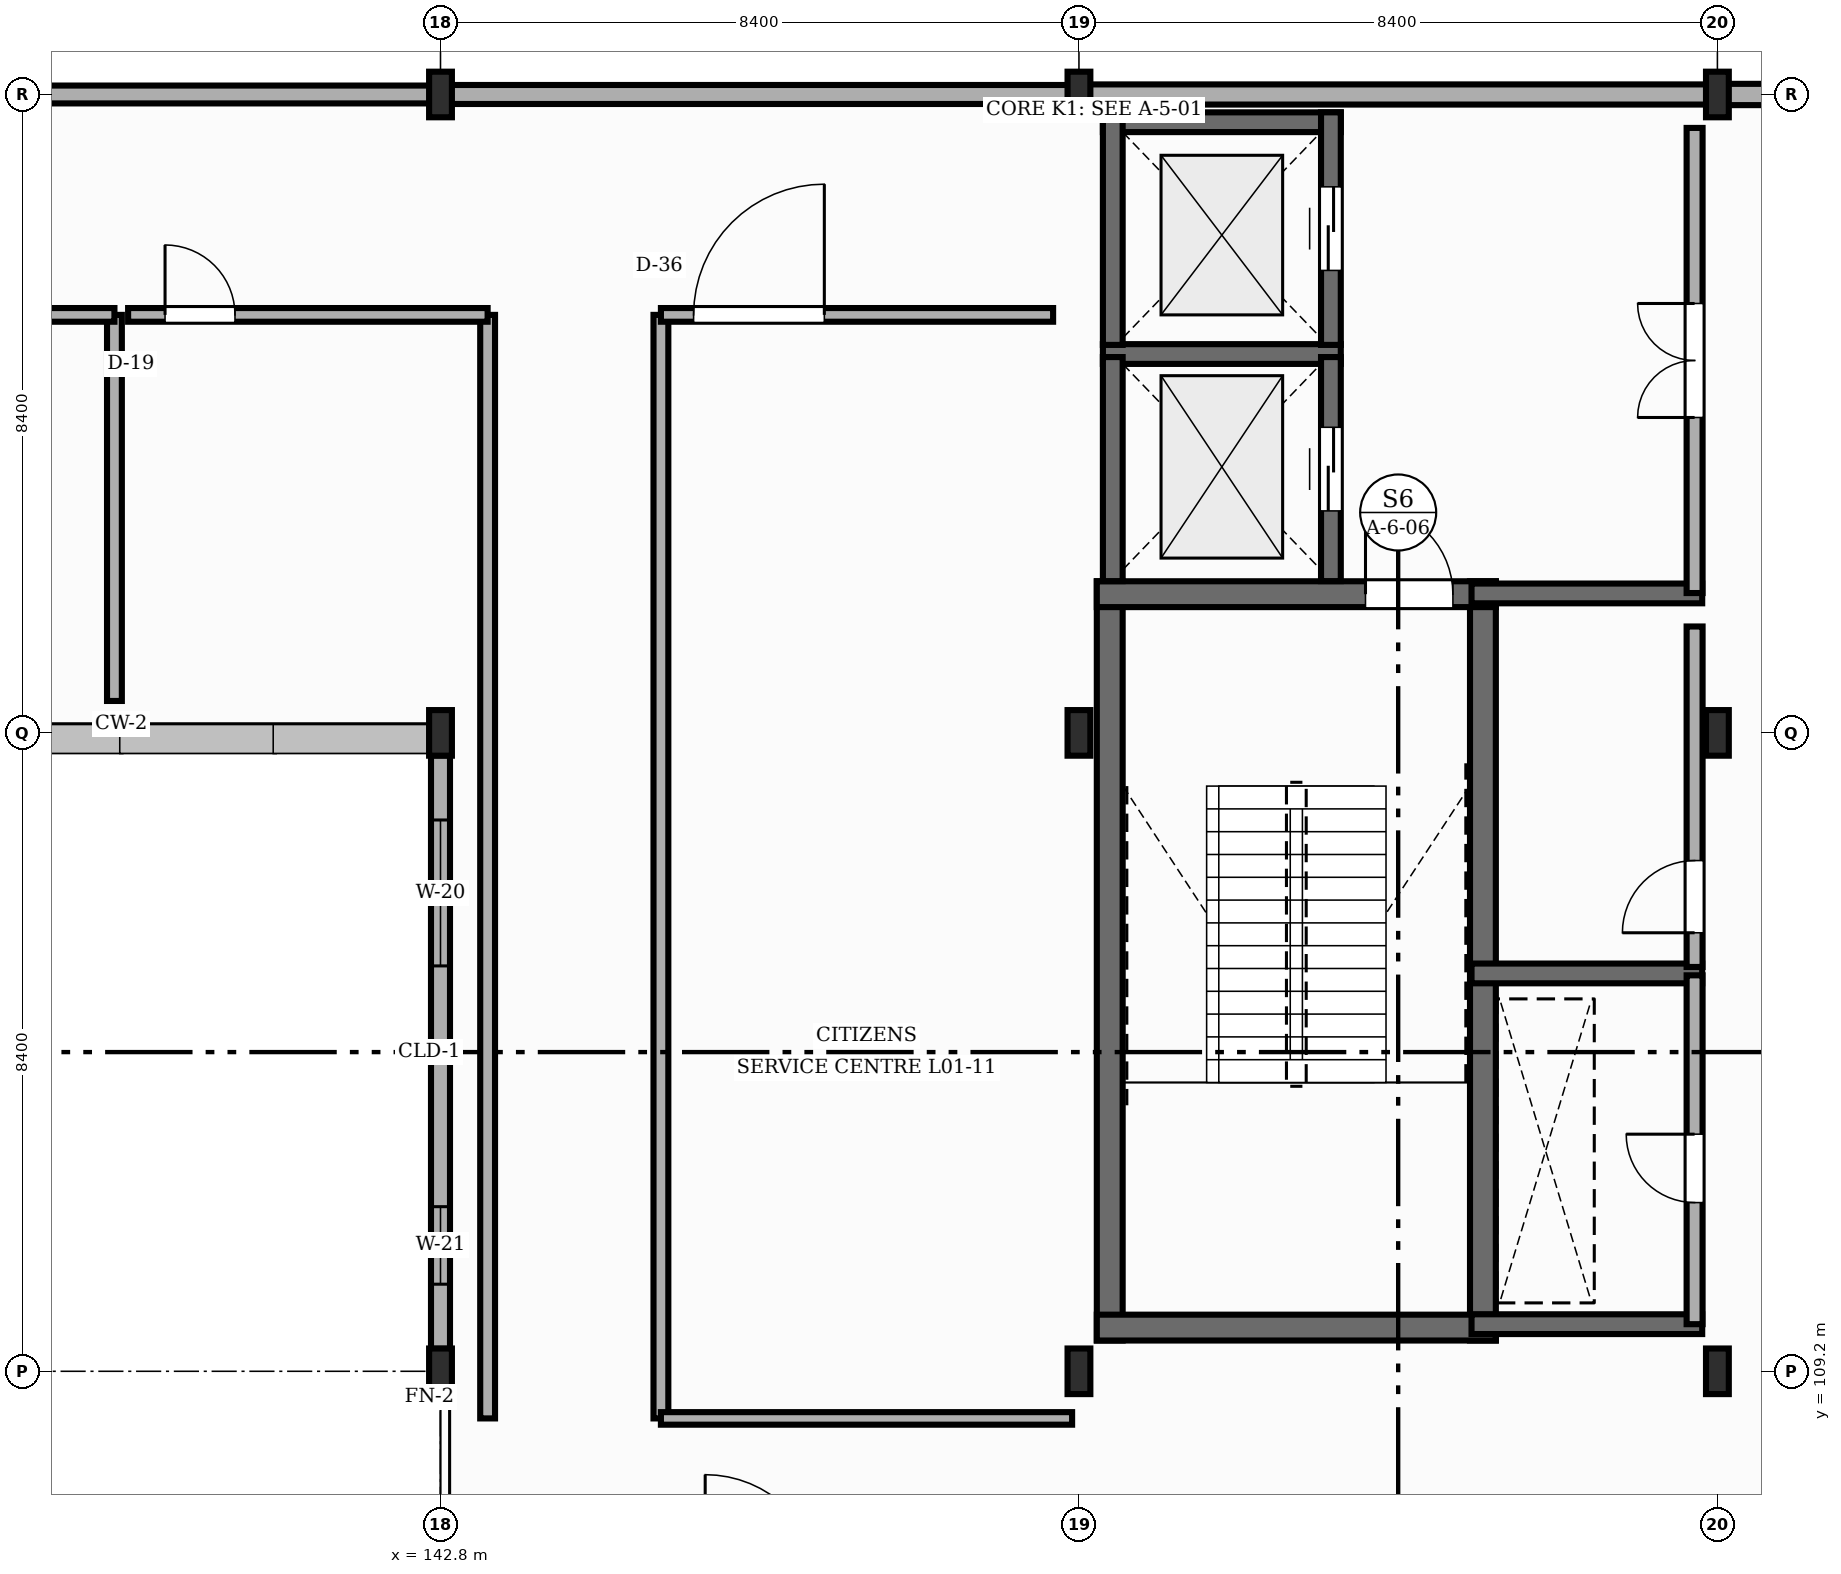
"""IFC4 building model, lengths in metres.
Left out: names, types, materials, properties, quantities, classifications, styles, units other than length and angle.
Written with IfcOpenShell. Run it as: python <this file> out.ifc"""

import sys

from ifc_helpers import new_model, si_unit, direction, frame, frame_2d, origin, origin_2d, place, context, subcontext, project, spatial, rectangle, i_section, extrude, element, fill, save


model = new_model("IFC4")
c1 = context("Model", 3, precision=1e-05, world=origin(), true_north=direction((0.0, 1.0)))
c2 = subcontext(c1, "Body", "Model", "MODEL_VIEW")
j1 = project(units=[si_unit("LENGTHUNIT", "METRE"), si_unit("PLANEANGLEUNIT", "RADIAN")], contexts=[c1])
p1 = place(None, origin())
s1 = spatial("IfcSite", under=j1, at=p1, CompositionType="ELEMENT")
p2 = place(p1, origin())
s2 = spatial("IfcBuilding", under=s1, at=p2, CompositionType="ELEMENT")
p3 = place(p2, frame((0.0, 0.0, 5.4)))
s3 = spatial("IfcBuildingStorey", under=s2, at=p3, CompositionType="ELEMENT", Elevation=5.4)
for number, where, z_axis, x_axis in (
    (1, (142.8, 109.2, 0.0), (0.0, 0.0, 1.0), (1.0, 0.0, 0.0)),
    (2, (142.8, 117.6, 0.0), (0.0, 0.0, 1.0), (1.0, 0.0, 0.0)),
    (3, (142.8, 126.0, 0.0), (0.0, 0.0, 1.0), (1.0, 0.0, 0.0)),
    (4, (151.2, 109.2, 0.0), (0.0, 0.0, 1.0), (1.0, 0.0, 0.0)),
    (5, (151.2, 117.6, 0.0), (0.0, 0.0, 1.0), (1.0, 0.0, 0.0)),
    (6, (151.2, 126.0, 0.0), (0.0, 0.0, 1.0), (1.0, 0.0, 0.0)),
    (7, (159.6, 109.2, 0.0), (0.0, 0.0, 1.0), (1.0, 0.0, 0.0)),
    (8, (159.6, 117.6, 0.0), (0.0, 0.0, 1.0), (1.0, 0.0, 0.0)),
    (9, (159.6, 126.0, 0.0), (0.0, 0.0, 1.0), (1.0, 0.0, 0.0)),
):
    element("IfcColumn", number, at=place(p3, frame(where, z_axis=z_axis, x_axis=x_axis)), inside=s3, PredefinedType="COLUMN", context=c2, shape_type="SweptSolid", body=[
        extrude(i_section(OverallWidth=0.3, OverallDepth=0.6, WebThickness=0.015, FlangeThickness=0.03, FilletRadius=0.027, at=origin_2d()), origin(), (0.0, 0.0, 1.0), 4.5),
    ])
p4 = place(p3, frame((142.8, 117.304, 0.0), z_axis=(0.0, 0.0, 1.0), x_axis=(0.0, -1.0, 0.0)))
e10 = element("IfcWall", 10, at=p4, inside=s3, PredefinedType="STANDARD", context=c2, shape_type="SweptSolid", body=[
    extrude(rectangle(XDim=7.808, YDim=0.25, at=frame_2d((3.904, 0.0))), origin(), (0.0, 0.0, 1.0), 3.922),
])
p5 = place(p4, frame((0.85, 0.0, 0.9)))
e11 = element("IfcOpeningElement", 11, at=p5, cuts=e10, PredefinedType="OPENING", context=c2, shape_type="SweptSolid", body=[
    extrude(rectangle(XDim=1.92, YDim=1.25, at=frame_2d((0.96, 0.625))), frame((0.0, 0.135, 0.0), z_axis=(0.0, -1.0, 0.0), x_axis=(1.0, 0.0, 0.0)), (0.0, 0.0, 1.0), 0.27),
])
p6 = place(p4, frame((5.938, 0.0, 0.9)))
e12 = element("IfcOpeningElement", 12, at=p6, cuts=e10, PredefinedType="OPENING", context=c2, shape_type="SweptSolid", body=[
    extrude(rectangle(XDim=1.02, YDim=1.45, at=frame_2d((0.51, 0.725))), frame((0.0, 0.135, 0.0), z_axis=(0.0, -1.0, 0.0), x_axis=(1.0, 0.0, 0.0)), (0.0, 0.0, 1.0), 0.27),
])
p7 = place(p3, frame((167.992, 126.0, 0.0), z_axis=(0.0, 0.0, 1.0), x_axis=(-1.0, 0.0, 0.0)))
e13 = element("IfcWall", 13, at=p7, inside=s3, PredefinedType="STANDARD", context=c2, shape_type="SweptSolid", body=[
    extrude(rectangle(XDim=8.384, YDim=0.28, at=frame_2d((4.192, 0.0))), origin(), (0.0, 0.0, 1.0), 3.922),
])
p8 = place(p3, frame((159.592, 126.0, 0.0), z_axis=(0.0, 0.0, 1.0), x_axis=(-1.0, 0.0, 0.0)))
e14 = element("IfcWall", 14, at=p8, inside=s3, PredefinedType="STANDARD", context=c2, shape_type="SweptSolid", body=[
    extrude(rectangle(XDim=8.384, YDim=0.265, at=frame_2d((4.192, 0.0))), origin(), (0.0, 0.0, 1.0), 3.952),
])
p9 = place(p3, frame((151.192, 126.0, 0.0), z_axis=(0.0, 0.0, 1.0), x_axis=(-1.0, 0.0, 0.0)))
e15 = element("IfcWall", 15, at=p9, inside=s3, PredefinedType="STANDARD", context=c2, shape_type="SweptSolid", body=[
    extrude(rectangle(XDim=8.384, YDim=0.25, at=frame_2d((4.192, 0.0))), origin(), (0.0, 0.0, 1.0), 3.922),
])
p10 = place(p3, frame((142.792, 126.0, 0.0), z_axis=(0.0, 0.0, 1.0), x_axis=(-1.0, 0.0, 0.0)))
e16 = element("IfcWall", 16, at=p10, inside=s3, PredefinedType="STANDARD", context=c2, shape_type="SweptSolid", body=[
    extrude(rectangle(XDim=8.384, YDim=0.235, at=frame_2d((4.192, 0.0))), origin(), (0.0, 0.0, 1.0), 3.952),
])
for number, where, z_axis, x_axis in (
    (17, (151.605, 109.605, 0.0), (0.0, 0.0, 1.0), (0.0, 1.0, 0.0)),
    (18, (156.515, 109.605, 0.0), (0.0, 0.0, 1.0), (0.0, 1.0, 0.0)),
):
    element("IfcWall", number, at=place(p3, frame(where, z_axis=z_axis, x_axis=x_axis)), inside=s3, PredefinedType="SHEAR", context=c2, shape_type="SweptSolid", body=[
        extrude(rectangle(XDim=9.99, YDim=0.34, at=frame_2d((4.995, 0.0))), origin(), (0.0, 0.0, 1.0), 4.29),
    ])
p11 = place(p3, frame((151.435, 109.775, 0.0), z_axis=(0.0, 0.0, 1.0), x_axis=(1.0, 0.0, 0.0)))
e19 = element("IfcWall", 19, at=p11, inside=s3, PredefinedType="SHEAR", context=c2, shape_type="SweptSolid", body=[
    extrude(rectangle(XDim=5.25, YDim=0.34, at=frame_2d((2.625, 0.0))), origin(), (0.0, 0.0, 1.0), 4.29),
])
p12 = place(p3, frame((151.435, 119.425, 0.0), z_axis=(0.0, 0.0, 1.0), x_axis=(1.0, 0.0, 0.0)))
e20 = element("IfcWall", 20, at=p12, inside=s3, PredefinedType="SHEAR", context=c2, shape_type="SweptSolid", body=[
    extrude(rectangle(XDim=5.25, YDim=0.34, at=frame_2d((2.625, 0.0))), origin(), (0.0, 0.0, 1.0), 4.29),
])
p13 = place(p12, frame((3.535, 0.0, 0.0)))
e21 = element("IfcOpeningElement", 21, at=p13, cuts=e20, PredefinedType="OPENING", context=c2, shape_type="SweptSolid", body=[
    extrude(rectangle(XDim=1.15, YDim=2.15, at=frame_2d((0.575, 1.075))), frame((0.0, 0.18, 0.0), z_axis=(0.0, -1.0, 0.0), x_axis=(1.0, 0.0, 0.0)), (0.0, 0.0, 1.0), 0.36),
])
p14 = place(p3, frame((151.515, 122.585, 0.0), z_axis=(0.0, 0.0, 1.0), x_axis=(1.0, 0.0, 0.0)))
e22 = element("IfcWall", 22, at=p14, inside=s3, PredefinedType="SHEAR", context=c2, shape_type="SweptSolid", body=[
    extrude(rectangle(XDim=3.13, YDim=0.26, at=frame_2d((1.565, 0.0))), origin(), (0.0, 0.0, 1.0), 4.29),
])
p15 = place(p3, frame((151.645, 119.597, 0.0), z_axis=(0.0, 0.0, 1.0), x_axis=(0.0, 1.0, 0.0)))
e23 = element("IfcWall", 23, at=p15, inside=s3, PredefinedType="SHEAR", context=c2, shape_type="SweptSolid", body=[
    extrude(rectangle(XDim=2.948, YDim=0.26, at=frame_2d((1.474, 0.0))), origin(), (0.0, 0.0, 1.0), 4.29),
])
p16 = place(p3, frame((154.515, 119.597, 0.0), z_axis=(0.0, 0.0, 1.0), x_axis=(0.0, 1.0, 0.0)))
e24 = element("IfcWall", 24, at=p16, inside=s3, PredefinedType="SHEAR", context=c2, shape_type="SweptSolid", body=[
    extrude(rectangle(XDim=2.948, YDim=0.26, at=frame_2d((1.474, 0.0))), origin(), (0.0, 0.0, 1.0), 4.29),
])
p17 = place(p16, frame((0.924, 0.0, 0.0)))
e25 = element("IfcOpeningElement", 25, at=p17, cuts=e24, PredefinedType="OPENING", context=c2, shape_type="SweptSolid", body=[
    extrude(rectangle(XDim=1.1, YDim=2.15, at=frame_2d((0.55, 1.075))), frame((0.0, 0.14, 0.0), z_axis=(0.0, -1.0, 0.0), x_axis=(1.0, 0.0, 0.0)), (0.0, 0.0, 1.0), 0.28),
])
p18 = place(p3, frame((151.515, 125.635, 0.0), z_axis=(0.0, 0.0, 1.0), x_axis=(1.0, 0.0, 0.0)))
e26 = element("IfcWall", 26, at=p18, inside=s3, PredefinedType="SHEAR", context=c2, shape_type="SweptSolid", body=[
    extrude(rectangle(XDim=3.13, YDim=0.26, at=frame_2d((1.565, 0.0))), origin(), (0.0, 0.0, 1.0), 4.29),
])
p19 = place(p3, frame((151.645, 122.705, 0.0), z_axis=(0.0, 0.0, 1.0), x_axis=(0.0, 1.0, 0.0)))
e27 = element("IfcWall", 27, at=p19, inside=s3, PredefinedType="SHEAR", context=c2, shape_type="SweptSolid", body=[
    extrude(rectangle(XDim=3.06, YDim=0.26, at=frame_2d((1.53, 0.0))), origin(), (0.0, 0.0, 1.0), 4.29),
])
p20 = place(p3, frame((154.515, 122.705, 0.0), z_axis=(0.0, 0.0, 1.0), x_axis=(0.0, 1.0, 0.0)))
e28 = element("IfcWall", 28, at=p20, inside=s3, PredefinedType="SHEAR", context=c2, shape_type="SweptSolid", body=[
    extrude(rectangle(XDim=3.06, YDim=0.26, at=frame_2d((1.53, 0.0))), origin(), (0.0, 0.0, 1.0), 4.29),
])
p21 = place(p20, frame((0.98, 0.0, 0.0)))
e29 = element("IfcOpeningElement", 29, at=p21, cuts=e28, PredefinedType="OPENING", context=c2, shape_type="SweptSolid", body=[
    extrude(rectangle(XDim=1.1, YDim=2.15, at=frame_2d((0.55, 1.075))), frame((0.0, 0.14, 0.0), z_axis=(0.0, -1.0, 0.0), x_axis=(1.0, 0.0, 0.0)), (0.0, 0.0, 1.0), 0.28),
])
for number, where, z_axis, x_axis in (
    (30, (156.365, 109.82, 0.0), (0.0, 0.0, 1.0), (1.0, 0.0, 0.0)),
    (31, (156.365, 114.435, 0.0), (0.0, 0.0, 1.0), (1.0, 0.0, 0.0)),
    (32, (156.365, 119.435, 0.0), (0.0, 0.0, 1.0), (1.0, 0.0, 0.0)),
):
    element("IfcWall", number, at=place(p3, frame(where, z_axis=z_axis, x_axis=x_axis)), inside=s3, PredefinedType="SHEAR", context=c2, shape_type="SweptSolid", body=[
        extrude(rectangle(XDim=3.035, YDim=0.26, at=frame_2d((1.518, 0.0))), origin(), (0.0, 0.0, 1.0), 4.29),
    ])
p22 = place(p3, frame((159.3, 109.82, 0.0), z_axis=(0.0, 0.0, 1.0), x_axis=(0.0, 1.0, 0.0)))
e33 = element("IfcWall", 33, at=p22, inside=s3, PredefinedType="STANDARD", context=c2, shape_type="SweptSolid", body=[
    extrude(rectangle(XDim=4.59, YDim=0.21, at=frame_2d((2.295, 0.0))), origin(), (0.0, 0.0, 1.0), 3.682),
])
p23 = place(p22, frame((1.6, 0.0, 0.0)))
e34 = element("IfcOpeningElement", 34, at=p23, cuts=e33, PredefinedType="OPENING", context=c2, shape_type="SweptSolid", body=[
    extrude(rectangle(XDim=0.9, YDim=2.1, at=frame_2d((0.45, 1.05))), frame((0.0, 0.115, 0.0), z_axis=(0.0, -1.0, 0.0), x_axis=(1.0, 0.0, 0.0)), (0.0, 0.0, 1.0), 0.23),
])
p24 = place(p3, frame((159.3, 114.52, 0.0), z_axis=(0.0, 0.0, 1.0), x_axis=(0.0, 1.0, 0.0)))
e35 = element("IfcWall", 35, at=p24, inside=s3, PredefinedType="STANDARD", context=c2, shape_type="SweptSolid", body=[
    extrude(rectangle(XDim=4.48, YDim=0.21, at=frame_2d((2.24, 0.0))), origin(), (0.0, 0.0, 1.0), 3.682),
])
p25 = place(p24, frame((0.45, 0.0, 0.0)))
e36 = element("IfcOpeningElement", 36, at=p25, cuts=e35, PredefinedType="OPENING", context=c2, shape_type="SweptSolid", body=[
    extrude(rectangle(XDim=0.95, YDim=2.15, at=frame_2d((0.475, 1.075))), frame((0.0, 0.115, 0.0), z_axis=(0.0, -1.0, 0.0), x_axis=(1.0, 0.0, 0.0)), (0.0, 0.0, 1.0), 0.23),
])
p26 = place(p3, frame((159.3, 119.44, 0.0), z_axis=(0.0, 0.0, 1.0), x_axis=(0.0, 1.0, 0.0)))
e37 = element("IfcWall", 37, at=p26, inside=s3, PredefinedType="STANDARD", context=c2, shape_type="SweptSolid", body=[
    extrude(rectangle(XDim=6.12, YDim=0.21, at=frame_2d((3.06, 0.0))), origin(), (0.0, 0.0, 1.0), 3.792),
])
p27 = place(p26, frame((2.31, 0.0, 0.0)))
e38 = element("IfcOpeningElement", 38, at=p27, cuts=e37, PredefinedType="OPENING", context=c2, shape_type="SweptSolid", body=[
    extrude(rectangle(XDim=1.5, YDim=2.2, at=frame_2d((0.75, 1.1))), frame((0.0, 0.115, 0.0), z_axis=(0.0, -1.0, 0.0), x_axis=(1.0, 0.0, 0.0)), (0.0, 0.0, 1.0), 0.23),
])
p28 = place(p3, frame((145.7, 108.58, -0.004), z_axis=(0.0, 0.0, 1.0), x_axis=(0.0, 1.0, 0.0)))
e39 = element("IfcWall", 39, at=p28, inside=s3, PredefinedType="STANDARD", context=c2, shape_type="SweptSolid", body=[
    extrude(rectangle(XDim=14.52, YDim=0.195, at=frame_2d((7.26, 0.0))), origin(), (0.0, 0.0, 1.0), 3.986),
])
p29 = place(p3, frame((145.7, 123.1, -0.004), z_axis=(0.0, 0.0, 1.0), x_axis=(1.0, 0.0, 0.0)))
e40 = element("IfcWall", 40, at=p29, inside=s3, PredefinedType="STANDARD", context=c2, shape_type="SweptSolid", body=[
    extrude(rectangle(XDim=5.16, YDim=0.18, at=frame_2d((2.58, 0.0))), origin(), (0.0, 0.0, 1.0), 4.294),
])
p30 = place(p29, frame((0.43, 0.0, 0.0)))
e41 = element("IfcOpeningElement", 41, at=p30, cuts=e40, PredefinedType="OPENING", context=c2, shape_type="SweptSolid", body=[
    extrude(rectangle(XDim=1.72, YDim=2.3, at=frame_2d((0.86, 1.15))), frame((0.0, 0.1, 0.0), z_axis=(0.0, -1.0, 0.0), x_axis=(1.0, 0.0, 0.0)), (0.0, 0.0, 1.0), 0.2),
])
p31 = place(p3, frame((151.11, 108.58, -0.004), z_axis=(0.0, 0.0, 1.0), x_axis=(-1.0, 0.0, 0.0)))
e42 = element("IfcWall", 42, at=p31, inside=s3, PredefinedType="STANDARD", context=c2, shape_type="SweptSolid", body=[
    extrude(rectangle(XDim=5.41, YDim=0.165, at=frame_2d((2.705, 0.0))), origin(), (0.0, 0.0, 1.0), 4.294),
])
p32 = place(p3, frame((138.51, 123.1, -0.004), z_axis=(0.0, 0.0, 1.0), x_axis=(0.0, -1.0, 0.0)))
e43 = element("IfcWall", 43, at=p32, inside=s3, PredefinedType="STANDARD", context=c2, shape_type="SweptSolid", body=[
    extrude(rectangle(XDim=5.08, YDim=0.195, at=frame_2d((2.54, 0.0))), origin(), (0.0, 0.0, 1.0), 4.294),
])
p33 = place(p3, frame((126.09, 123.1, -0.004), z_axis=(0.0, 0.0, 1.0), x_axis=(1.0, 0.0, 0.0)))
e44 = element("IfcWall", 44, at=p33, inside=s3, PredefinedType="STANDARD", context=c2, shape_type="SweptSolid", body=[
    extrude(rectangle(XDim=12.42, YDim=0.18, at=frame_2d((6.21, 0.0))), origin(), (0.0, 0.0, 1.0), 4.294),
])
p34 = place(p33, frame((3.857, 0.0, 0.0)))
e45 = element("IfcOpeningElement", 45, at=p34, cuts=e44, PredefinedType="OPENING", context=c2, shape_type="SweptSolid", body=[
    extrude(rectangle(XDim=0.98, YDim=2.14, at=frame_2d((0.49, 1.07))), frame((0.0, 0.1, 0.0), z_axis=(0.0, -1.0, 0.0), x_axis=(1.0, 0.0, 0.0)), (0.0, 0.0, 1.0), 0.2),
])
p35 = place(p3, frame((143.42, 123.1, -0.004), z_axis=(0.0, 0.0, 1.0), x_axis=(0.0, -1.0, 0.0)))
e46 = element("IfcWall", 46, at=p35, inside=s3, PredefinedType="STANDARD", context=c2, shape_type="SweptSolid", body=[
    extrude(rectangle(XDim=14.52, YDim=0.195, at=frame_2d((7.26, 0.0))), origin(), (0.0, 0.0, 1.0), 4.294),
])
p36 = place(p3, frame((138.69, 123.1, -0.004), z_axis=(0.0, 0.0, 1.0), x_axis=(1.0, 0.0, 0.0)))
e47 = element("IfcWall", 47, at=p36, inside=s3, PredefinedType="STANDARD", context=c2, shape_type="SweptSolid", body=[
    extrude(rectangle(XDim=4.73, YDim=0.18, at=frame_2d((2.365, 0.0))), origin(), (0.0, 0.0, 1.0), 4.294),
])
p37 = place(p36, frame((0.486, 0.0, 0.0)))
e48 = element("IfcOpeningElement", 48, at=p37, cuts=e47, PredefinedType="OPENING", context=c2, shape_type="SweptSolid", body=[
    extrude(rectangle(XDim=0.92, YDim=2.22, at=frame_2d((0.46, 1.11))), frame((0.0, 0.1, 0.0), z_axis=(0.0, -1.0, 0.0), x_axis=(1.0, 0.0, 0.0)), (0.0, 0.0, 1.0), 0.2),
])
p38 = place(p5, origin())
e49 = element("IfcWindow", 49, at=p38, inside=s3, PartitioningType="SINGLE_PANEL", PredefinedType="WINDOW", context=c2, shape_type="SweptSolid", body=[
    extrude(rectangle(XDim=1.92, YDim=1.25, at=frame_2d((0.96, 0.625))), frame((0.0, 0.03, 0.0), z_axis=(0.0, -1.0, 0.0), x_axis=(1.0, 0.0, 0.0)), (0.0, 0.0, 1.0), 0.06),
])
fill(e11, e49)
p39 = place(p6, origin())
e50 = element("IfcWindow", 50, at=p39, inside=s3, PartitioningType="SINGLE_PANEL", PredefinedType="WINDOW", context=c2, shape_type="SweptSolid", body=[
    extrude(rectangle(XDim=1.02, YDim=1.45, at=frame_2d((0.51, 0.725))), frame((0.0, 0.03, 0.0), z_axis=(0.0, -1.0, 0.0), x_axis=(1.0, 0.0, 0.0)), (0.0, 0.0, 1.0), 0.06),
])
fill(e12, e50)
p40 = place(p13, origin())
e51 = element("IfcDoor", 51, at=p40, inside=s3, OperationType="SINGLE_SWING_LEFT", PredefinedType="DOOR", context=c2, shape_type="SweptSolid", body=[
    extrude(rectangle(XDim=1.15, YDim=2.15, at=frame_2d((0.575, 1.075))), frame((0.0, 0.025, 0.0), z_axis=(0.0, -1.0, 0.0), x_axis=(1.0, 0.0, 0.0)), (0.0, 0.0, 1.0), 0.05),
])
fill(e21, e51)
p41 = place(p17, origin())
e52 = element("IfcDoor", 52, at=p41, inside=s3, OperationType="DOUBLE_DOOR_SLIDING", PredefinedType="DOOR", context=c2, shape_type="SweptSolid", body=[
    extrude(rectangle(XDim=1.1, YDim=2.15, at=frame_2d((0.55, 1.075))), frame((0.0, 0.025, 0.0), z_axis=(0.0, -1.0, 0.0), x_axis=(1.0, 0.0, 0.0)), (0.0, 0.0, 1.0), 0.05),
])
fill(e25, e52)
p42 = place(p21, origin())
e53 = element("IfcDoor", 53, at=p42, inside=s3, OperationType="DOUBLE_DOOR_SLIDING", PredefinedType="DOOR", context=c2, shape_type="SweptSolid", body=[
    extrude(rectangle(XDim=1.1, YDim=2.15, at=frame_2d((0.55, 1.075))), frame((0.0, 0.025, 0.0), z_axis=(0.0, -1.0, 0.0), x_axis=(1.0, 0.0, 0.0)), (0.0, 0.0, 1.0), 0.05),
])
fill(e29, e53)
p43 = place(p23, origin())
e54 = element("IfcDoor", 54, at=p43, inside=s3, OperationType="SINGLE_SWING_RIGHT", PredefinedType="DOOR", context=c2, shape_type="SweptSolid", body=[
    extrude(rectangle(XDim=0.9, YDim=2.1, at=frame_2d((0.45, 1.05))), frame((0.0, 0.025, 0.0), z_axis=(0.0, -1.0, 0.0), x_axis=(1.0, 0.0, 0.0)), (0.0, 0.0, 1.0), 0.05),
])
fill(e34, e54)
p44 = place(p25, origin())
e55 = element("IfcDoor", 55, at=p44, inside=s3, OperationType="SINGLE_SWING_LEFT", PredefinedType="DOOR", context=c2, shape_type="SweptSolid", body=[
    extrude(rectangle(XDim=0.95, YDim=2.15, at=frame_2d((0.475, 1.075))), frame((0.0, 0.025, 0.0), z_axis=(0.0, -1.0, 0.0), x_axis=(1.0, 0.0, 0.0)), (0.0, 0.0, 1.0), 0.05),
])
fill(e36, e55)
p45 = place(p27, origin())
e56 = element("IfcDoor", 56, at=p45, inside=s3, OperationType="DOUBLE_DOOR_SINGLE_SWING", PredefinedType="DOOR", context=c2, shape_type="SweptSolid", body=[
    extrude(rectangle(XDim=1.5, YDim=2.2, at=frame_2d((0.75, 1.1))), frame((0.0, 0.025, 0.0), z_axis=(0.0, -1.0, 0.0), x_axis=(1.0, 0.0, 0.0)), (0.0, 0.0, 1.0), 0.05),
])
fill(e38, e56)
p46 = place(p30, origin())
e57 = element("IfcDoor", 57, at=p46, inside=s3, OperationType="SINGLE_SWING_RIGHT", PredefinedType="DOOR", context=c2, shape_type="SweptSolid", body=[
    extrude(rectangle(XDim=1.72, YDim=2.3, at=frame_2d((0.86, 1.15))), frame((0.0, 0.025, 0.0), z_axis=(0.0, -1.0, 0.0), x_axis=(1.0, 0.0, 0.0)), (0.0, 0.0, 1.0), 0.05),
])
fill(e41, e57)
p47 = place(p37, origin())
e58 = element("IfcDoor", 58, at=p47, inside=s3, OperationType="SINGLE_SWING_LEFT", PredefinedType="DOOR", context=c2, shape_type="SweptSolid", body=[
    extrude(rectangle(XDim=0.92, YDim=2.22, at=frame_2d((0.46, 1.11))), frame((0.0, 0.025, 0.0), z_axis=(0.0, -1.0, 0.0), x_axis=(1.0, 0.0, 0.0)), (0.0, 0.0, 1.0), 0.05),
])
fill(e48, e58)
save(model, sys.argv[1])
